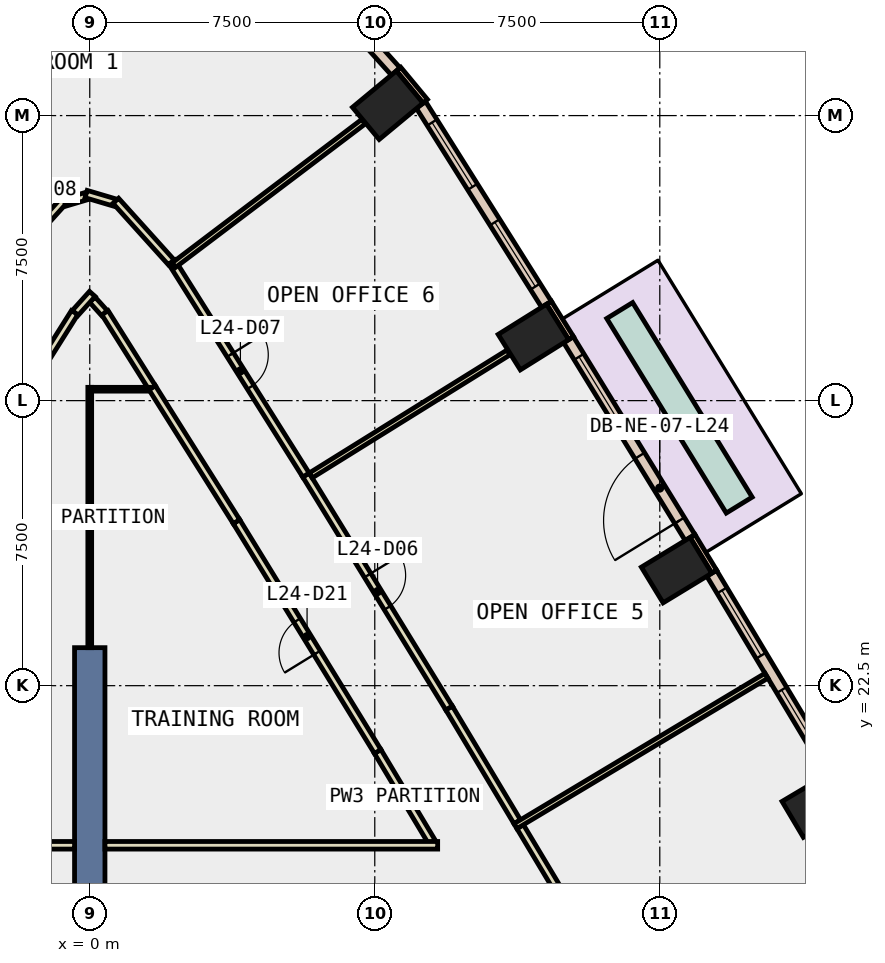
"""IFC4 building model, lengths in metres.
Left out: names, types, materials, properties, quantities, classifications, styles, units other than length and angle.
Written with IfcOpenShell. Run it as: python <this file> out.ifc"""

import sys

from ifc_helpers import new_model, si_unit, direction, frame, frame_2d, origin, origin_2d, place, context, subcontext, project, spatial, rectangle, extrude, element, fill, save


model = new_model("IFC4")
c1 = context("Model", 3, precision=1e-05, world=origin(), true_north=direction((0.0, 1.0)))
c2 = subcontext(c1, "Body", "Model", "MODEL_VIEW")
j1 = project(units=[si_unit("LENGTHUNIT", "METRE"), si_unit("PLANEANGLEUNIT", "RADIAN")], contexts=[c1])
p1 = place(None, origin())
s1 = spatial("IfcSite", under=j1, at=p1, CompositionType="ELEMENT")
p2 = place(p1, origin())
s2 = spatial("IfcBuilding", under=s1, at=p2, CompositionType="ELEMENT")
p3 = place(p2, frame((0.0, 0.0, 111.8)))
s3 = spatial("IfcBuildingStorey", under=s2, at=p3, CompositionType="ELEMENT", Elevation=111.8)
for number, where, z_axis, x_axis in (
    (1, (19.143, 19.364, -0.4), (0.0, 0.0, 1.0), (-0.51, 0.86, 0.0)),
    (2, (15.442, 25.539, -0.4), (0.0, 0.0, 1.0), (-0.52, 0.854, 0.0)),
    (3, (11.675, 31.673, -0.4), (0.0, 0.0, 1.0), (-0.53, 0.848, 0.0)),
    (4, (7.842, 37.774, -0.4), (0.0, 0.0, 1.0), (-0.638, 0.77, 0.0)),
):
    element("IfcColumn", number, at=place(p3, frame(where, z_axis=z_axis, x_axis=x_axis)), inside=s3, PredefinedType="COLUMN", context=c2, shape_type="SweptSolid", body=[
        extrude(rectangle(XDim=1.1, YDim=1.5, at=origin_2d()), origin(), (0.0, 0.0, 1.0), 4.2),
    ])
p4 = place(p3, frame((0.0, 14.5, -0.4), z_axis=(0.0, 0.0, 1.0), x_axis=(0.0, 1.0, 0.0)))
e5 = element("IfcWall", 5, at=p4, inside=s3, PredefinedType="SHEAR", context=c2, shape_type="SweptSolid", body=[
    extrude(rectangle(XDim=9.0, YDim=0.8, at=frame_2d((4.5, 0.0))), origin(), (0.0, 0.0, 1.0), 4.2),
])
p5 = place(p3, frame((16.433, 25.498, 0.0), z_axis=(0.0, 0.0, 1.0), x_axis=(-0.519869515594, 0.854245682901, 0.0)))
e6 = element("IfcWall", 6, at=p5, inside=s3, PredefinedType="STANDARD", context=c2, shape_type="SweptSolid", body=[
    extrude(rectangle(XDim=1.1, YDim=0.15, at=frame_2d((0.55, 0.0))), origin(), (0.0, 0.0, 1.0), 3.8),
])
p6 = place(p3, frame((12.666, 31.644, 0.0), z_axis=(0.0, 0.0, 1.0), x_axis=(-0.52997899071, 0.848010771987, 0.0)))
e7 = element("IfcWall", 7, at=p6, inside=s3, PredefinedType="STANDARD", context=c2, shape_type="SweptSolid", body=[
    extrude(rectangle(XDim=1.1, YDim=0.15, at=frame_2d((0.55, 0.0))), origin(), (0.0, 0.0, 1.0), 3.8),
])
p7 = place(p3, frame((8.828, 37.878, 0.0), z_axis=(0.0, 0.0, 1.0), x_axis=(-0.638435351024, 0.769675452748, 0.0)))
e8 = element("IfcWall", 8, at=p7, inside=s3, PredefinedType="STANDARD", context=c2, shape_type="SweptSolid", body=[
    extrude(rectangle(XDim=1.099, YDim=0.15, at=frame_2d((0.55, 0.0))), origin(), (0.0, 0.0, 1.0), 3.8),
])
p8 = place(p3, frame((19.506, 20.217, 0.0), z_axis=(0.0, 0.0, 1.0), x_axis=(-0.514078503149, 0.857743139057, 0.0)))
e9 = element("IfcWall", 9, at=p8, inside=s3, PredefinedType="STANDARD", context=c2, shape_type="SweptSolid", body=[
    extrude(rectangle(XDim=6.11, YDim=0.3, at=frame_2d((3.055, 0.0))), origin(), (0.0, 0.0, 1.0), 3.8),
])
p9 = place(p8, frame((0.528, 0.0, 0.9)))
e10 = element("IfcOpeningElement", 10, at=p9, cuts=e9, PredefinedType="OPENING", context=c2, shape_type="SweptSolid", body=[
    extrude(rectangle(XDim=2.0, YDim=2.6, at=frame_2d((1.0, 1.3))), frame((0.0, 0.16, 0.0), z_axis=(0.0, -1.0, 0.0), x_axis=(1.0, 0.0, 0.0)), (0.0, 0.0, 1.0), 0.32),
])
p10 = place(p8, frame((3.583, 0.0, 0.9)))
e11 = element("IfcOpeningElement", 11, at=p10, cuts=e9, PredefinedType="OPENING", context=c2, shape_type="SweptSolid", body=[
    extrude(rectangle(XDim=2.0, YDim=2.6, at=frame_2d((1.0, 1.3))), frame((0.0, 0.16, 0.0), z_axis=(0.0, -1.0, 0.0), x_axis=(1.0, 0.0, 0.0)), (0.0, 0.0, 1.0), 0.32),
])
p11 = place(p3, frame((15.796, 26.397, 0.0), z_axis=(0.0, 0.0, 1.0), x_axis=(-0.523417276981, 0.852076495485, 0.0)))
e12 = element("IfcWall", 12, at=p11, inside=s3, PredefinedType="STANDARD", context=c2, shape_type="SweptSolid", body=[
    extrude(rectangle(XDim=6.11, YDim=0.3, at=frame_2d((3.055, 0.0))), origin(), (0.0, 0.0, 1.0), 3.8),
])
p12 = place(p11, frame((0.527, 0.0, 0.0)))
e13 = element("IfcOpeningElement", 13, at=p12, cuts=e12, PredefinedType="OPENING", context=c2, shape_type="SweptSolid", body=[
    extrude(rectangle(XDim=2.0, YDim=2.4, at=frame_2d((1.0, 1.2))), frame((0.0, 0.16, 0.0), z_axis=(0.0, -1.0, 0.0), x_axis=(1.0, 0.0, 0.0)), (0.0, 0.0, 1.0), 0.32),
])
p13 = place(p11, frame((3.582, 0.0, 0.9)))
e14 = element("IfcOpeningElement", 14, at=p13, cuts=e12, PredefinedType="OPENING", context=c2, shape_type="SweptSolid", body=[
    extrude(rectangle(XDim=2.0, YDim=2.6, at=frame_2d((1.0, 1.3))), frame((0.0, 0.16, 0.0), z_axis=(0.0, -1.0, 0.0), x_axis=(1.0, 0.0, 0.0)), (0.0, 0.0, 1.0), 0.32),
])
p14 = place(p3, frame((12.018, 32.535, 0.0), z_axis=(0.0, 0.0, 1.0), x_axis=(-0.532699467907, 0.846304482377, 0.0)))
e15 = element("IfcWall", 15, at=p14, inside=s3, PredefinedType="STANDARD", context=c2, shape_type="SweptSolid", body=[
    extrude(rectangle(XDim=6.202, YDim=0.3, at=frame_2d((3.101, 0.0))), origin(), (0.0, 0.0, 1.0), 3.8),
])
p15 = place(p14, frame((0.551, 0.0, 0.9)))
e16 = element("IfcOpeningElement", 16, at=p15, cuts=e15, PredefinedType="OPENING", context=c2, shape_type="SweptSolid", body=[
    extrude(rectangle(XDim=2.0, YDim=2.6, at=frame_2d((1.0, 1.3))), frame((0.0, 0.16, 0.0), z_axis=(0.0, -1.0, 0.0), x_axis=(1.0, 0.0, 0.0)), (0.0, 0.0, 1.0), 0.32),
])
p16 = place(p14, frame((3.652, 0.0, 0.9)))
e17 = element("IfcOpeningElement", 17, at=p16, cuts=e15, PredefinedType="OPENING", context=c2, shape_type="SweptSolid", body=[
    extrude(rectangle(XDim=2.0, YDim=2.6, at=frame_2d((1.0, 1.3))), frame((0.0, 0.16, 0.0), z_axis=(0.0, -1.0, 0.0), x_axis=(1.0, 0.0, 0.0)), (0.0, 0.0, 1.0), 0.32),
])
p17 = place(p3, frame((8.052, 38.661, 0.0), z_axis=(0.0, 0.0, 1.0), x_axis=(-0.66966434159, 0.742663900834, 0.0)))
e18 = element("IfcWall", 18, at=p17, inside=s3, PredefinedType="STANDARD", context=c2, shape_type="SweptSolid", body=[
    extrude(rectangle(XDim=3.893, YDim=0.3, at=frame_2d((1.946, 0.0))), origin(), (0.0, 0.0, 1.0), 3.8),
])
p18 = place(p17, frame((1.246, 0.0, 0.9)))
e19 = element("IfcOpeningElement", 19, at=p18, cuts=e18, PredefinedType="OPENING", context=c2, shape_type="SweptSolid", body=[
    extrude(rectangle(XDim=1.4, YDim=2.6, at=frame_2d((0.7, 1.3))), frame((0.0, 0.16, 0.0), z_axis=(0.0, -1.0, 0.0), x_axis=(1.0, 0.0, 0.0)), (0.0, 0.0, 1.0), 0.32),
])
p19 = place(p3, frame((17.09, 27.251, 0.0), z_axis=(0.0, 0.0, 1.0), x_axis=(-0.523394506734, 0.852090482473, 0.0)))
e20 = element("IfcWall", 20, at=p19, inside=s3, PredefinedType="STANDARD", context=c2, shape_type="SweptSolid", body=[
    extrude(rectangle(XDim=6.009, YDim=0.8, at=frame_2d((3.004, 0.0))), origin(), (0.0, 0.0, 1.0), 0.8),
])
p20 = place(p3, frame((9.003, 18.386, 0.0), z_axis=(0.0, 0.0, 1.0), x_axis=(-0.513900868925, 0.857849577092, 0.0)))
e21 = element("IfcWall", 21, at=p20, inside=s3, PredefinedType="PARTITIONING", context=c2, shape_type="SweptSolid", body=[
    extrude(rectangle(XDim=2.777, YDim=0.2, at=frame_2d((1.388, 0.0))), origin(), (0.0, 0.0, 1.0), 3.8),
])
p21 = place(p3, frame((7.576, 20.768, 0.0), z_axis=(0.0, 0.0, 1.0), x_axis=(-0.523390991338, 0.852092641786, 0.0)))
e22 = element("IfcWall", 22, at=p21, inside=s3, PredefinedType="PARTITIONING", context=c2, shape_type="SweptSolid", body=[
    extrude(rectangle(XDim=7.098, YDim=0.2, at=frame_2d((3.549, 0.0))), origin(), (0.0, 0.0, 1.0), 3.8),
])
p22 = place(p21, frame((3.049, 0.0, 0.0)))
e23 = element("IfcOpeningElement", 23, at=p22, cuts=e22, PredefinedType="OPENING", context=c2, shape_type="SweptSolid", body=[
    extrude(rectangle(XDim=1.0, YDim=2.1, at=frame_2d((0.5, 1.05))), frame((0.0, 0.11, 0.0), z_axis=(0.0, -1.0, 0.0), x_axis=(1.0, 0.0, 0.0)), (0.0, 0.0, 1.0), 0.22),
])
p23 = place(p3, frame((3.861, 26.816, 0.0), z_axis=(0.0, 0.0, 1.0), x_axis=(-0.532782188792, 0.846252408745, 0.0)))
e24 = element("IfcWall", 24, at=p23, inside=s3, PredefinedType="PARTITIONING", context=c2, shape_type="SweptSolid", body=[
    extrude(rectangle(XDim=4.167, YDim=0.2, at=frame_2d((2.083, 0.0))), origin(), (0.0, 0.0, 1.0), 3.8),
])
p24 = place(p3, frame((1.641, 30.342, 0.0), z_axis=(0.0, 0.0, 1.0), x_axis=(-0.532732797088, 0.846283502679, 0.0)))
e25 = element("IfcWall", 25, at=p24, inside=s3, PredefinedType="PARTITIONING", context=c2, shape_type="SweptSolid", body=[
    extrude(rectangle(XDim=2.333, YDim=0.2, at=frame_2d((1.167, 0.0))), origin(), (0.0, 0.0, 1.0), 3.8),
])
p25 = place(p3, frame((0.384, 32.306, 0.0), z_axis=(0.0, 0.0, 1.0), x_axis=(-0.669306261406, 0.742986627365, 0.0)))
e26 = element("IfcWall", 26, at=p25, inside=s3, PredefinedType="PARTITIONING", context=c2, shape_type="SweptSolid", body=[
    extrude(rectangle(XDim=0.474, YDim=0.2, at=frame_2d((0.237, 0.0))), origin(), (0.0, 0.0, 1.0), 3.8),
])
p26 = place(p3, frame((0.067, 32.807, 0.0), z_axis=(0.0, 0.0, 1.0), x_axis=(-0.66900475403, -0.74325812413, 0.0)))
e27 = element("IfcWall", 27, at=p26, inside=s3, PredefinedType="PARTITIONING", context=c2, shape_type="SweptSolid", body=[
    extrude(rectangle(XDim=0.674, YDim=0.2, at=frame_2d((0.337, 0.0))), origin(), (0.0, 0.0, 1.0), 3.8),
])
p27 = place(p3, frame((-0.398, 32.317, 0.0), z_axis=(0.0, 0.0, 1.0), x_axis=(-0.53276445777, -0.846263571553, 0.0)))
e28 = element("IfcWall", 28, at=p27, inside=s3, PredefinedType="PARTITIONING", context=c2, shape_type="SweptSolid", body=[
    extrude(rectangle(XDim=6.5, YDim=0.2, at=frame_2d((3.25, 0.0))), origin(), (0.0, 0.0, 1.0), 3.8),
])
p28 = place(p3, frame((11.326, 18.79, 0.0), z_axis=(0.0, 0.0, 1.0), x_axis=(0.514155958966, -0.857696712049, 0.0)))
e29 = element("IfcWall", 29, at=p28, inside=s3, PredefinedType="PARTITIONING", context=c2, shape_type="SweptSolid", body=[
    extrude(rectangle(XDim=3.487, YDim=0.2, at=frame_2d((1.744, 0.0))), origin(), (0.0, 0.0, 1.0), 3.8),
])
p29 = place(p3, frame((5.69, 28.042, 0.0), z_axis=(0.0, 0.0, 1.0), x_axis=(0.523381868706, -0.852098245222, 0.0)))
e30 = element("IfcWall", 30, at=p29, inside=s3, PredefinedType="PARTITIONING", context=c2, shape_type="SweptSolid", body=[
    extrude(rectangle(XDim=7.198, YDim=0.2, at=frame_2d((3.599, 0.0))), origin(), (0.0, 0.0, 1.0), 3.8),
])
p30 = place(p29, frame((3.099, 0.0, 0.0)))
e31 = element("IfcOpeningElement", 31, at=p30, cuts=e30, PredefinedType="OPENING", context=c2, shape_type="SweptSolid", body=[
    extrude(rectangle(XDim=1.0, YDim=2.1, at=frame_2d((0.5, 1.05))), frame((0.0, 0.11, 0.0), z_axis=(0.0, -1.0, 0.0), x_axis=(1.0, 0.0, 0.0)), (0.0, 0.0, 1.0), 0.22),
])
p31 = place(p3, frame((9.457, 21.909, 0.0), z_axis=(0.0, 0.0, 1.0), x_axis=(0.513949903813, -0.857820200491, 0.0)))
e32 = element("IfcWall", 32, at=p31, inside=s3, PredefinedType="PARTITIONING", context=c2, shape_type="SweptSolid", body=[
    extrude(rectangle(XDim=3.487, YDim=0.2, at=frame_2d((1.743, 0.0))), origin(), (0.0, 0.0, 1.0), 3.8),
])
p32 = place(p3, frame((2.159, 33.649, 0.0), z_axis=(0.0, 0.0, 1.0), x_axis=(0.532784927572, -0.846250684462, 0.0)))
e33 = element("IfcWall", 33, at=p32, inside=s3, PredefinedType="PARTITIONING", context=c2, shape_type="SweptSolid", body=[
    extrude(rectangle(XDim=6.626, YDim=0.2, at=frame_2d((3.313, 0.0))), origin(), (0.0, 0.0, 1.0), 3.8),
])
p33 = place(p32, frame((2.888, 0.0, 0.0)))
e34 = element("IfcOpeningElement", 34, at=p33, cuts=e33, PredefinedType="OPENING", context=c2, shape_type="SweptSolid", body=[
    extrude(rectangle(XDim=1.0, YDim=2.1, at=frame_2d((0.5, 1.05))), frame((0.0, 0.11, 0.0), z_axis=(0.0, -1.0, 0.0), x_axis=(1.0, 0.0, 0.0)), (0.0, 0.0, 1.0), 0.22),
])
p34 = place(p3, frame((-2.145, 33.639, 0.0), z_axis=(0.0, 0.0, 1.0), x_axis=(0.66965737341, 0.742670184023, 0.0)))
e35 = element("IfcWall", 35, at=p34, inside=s3, PredefinedType="PARTITIONING", context=c2, shape_type="SweptSolid", body=[
    extrude(rectangle(XDim=2.18, YDim=0.2, at=frame_2d((1.09, 0.0))), origin(), (0.0, 0.0, 1.0), 3.8),
])
p35 = place(p34, frame((0.59, 0.0, 0.0)))
e36 = element("IfcOpeningElement", 36, at=p35, cuts=e35, PredefinedType="OPENING", context=c2, shape_type="SweptSolid", body=[
    extrude(rectangle(XDim=1.0, YDim=2.1, at=frame_2d((0.5, 1.05))), frame((0.0, 0.11, 0.0), z_axis=(0.0, -1.0, 0.0), x_axis=(1.0, 0.0, 0.0)), (0.0, 0.0, 1.0), 0.22),
])
p36 = place(p3, frame((-0.656, 35.213, 0.0), z_axis=(0.0, 0.0, 1.0), x_axis=(0.958764375257, 0.284202168777, 0.0)))
e37 = element("IfcWall", 37, at=p36, inside=s3, PredefinedType="PARTITIONING", context=c2, shape_type="SweptSolid", body=[
    extrude(rectangle(XDim=0.584, YDim=0.2, at=frame_2d((0.292, 0.0))), origin(), (0.0, 0.0, 1.0), 3.8),
])
p37 = place(p3, frame((-0.096, 35.436, 0.0), z_axis=(0.0, 0.0, 1.0), x_axis=(0.95867870552, -0.284491018456, 0.0)))
e38 = element("IfcWall", 38, at=p37, inside=s3, PredefinedType="PARTITIONING", context=c2, shape_type="SweptSolid", body=[
    extrude(rectangle(XDim=0.784, YDim=0.2, at=frame_2d((0.392, 0.0))), origin(), (0.0, 0.0, 1.0), 3.8),
])
p38 = place(p3, frame((0.685, 35.258, 0.0), z_axis=(0.0, 0.0, 1.0), x_axis=(0.66965737341, -0.742670184023, 0.0)))
e39 = element("IfcWall", 39, at=p38, inside=s3, PredefinedType="PARTITIONING", context=c2, shape_type="SweptSolid", body=[
    extrude(rectangle(XDim=2.18, YDim=0.2, at=frame_2d((1.09, 0.0))), origin(), (0.0, 0.0, 1.0), 3.8),
])
for number, where, z_axis, x_axis in (
    (40, (0.4, 18.3, 0.0), (0.0, 0.0, 1.0), (1.0, 0.0, 0.0)),
    (41, (-9.155, 18.3, 0.0), (0.0, 0.0, 1.0), (1.0, 0.0, 0.0)),
):
    element("IfcWall", number, at=place(p3, frame(where, z_axis=z_axis, x_axis=x_axis)), inside=s3, PredefinedType="PARTITIONING", context=c2, shape_type="SweptSolid", body=[
        extrude(rectangle(XDim=8.755, YDim=0.2, at=frame_2d((4.377, 0.0))), origin(), (0.0, 0.0, 1.0), 3.8),
    ])
p39 = place(p3, frame((0.0, 23.5, 0.0), z_axis=(0.0, 0.0, 1.0), x_axis=(0.0, 1.0, 0.0)))
e42 = element("IfcWall", 42, at=p39, inside=s3, PredefinedType="PARTITIONING", context=c2, shape_type="SweptSolid", body=[
    extrude(rectangle(XDim=6.85, YDim=0.1, at=frame_2d((3.425, 0.0))), origin(), (0.0, 0.0, 1.0), 3.8),
])
p40 = place(p3, frame((0.05, 30.3, 0.0), z_axis=(0.0, 0.0, 1.0), x_axis=(1.0, 0.0, 0.0)))
e43 = element("IfcWall", 43, at=p40, inside=s3, PredefinedType="PARTITIONING", context=c2, shape_type="SweptSolid", body=[
    extrude(rectangle(XDim=1.518, YDim=0.1, at=frame_2d((0.759, 0.0))), origin(), (0.0, 0.0, 1.0), 3.8),
])
p41 = place(p3, frame((11.202, 18.803, 0.0), z_axis=(0.0, 0.0, 1.0), x_axis=(0.857778149162, 0.514020084062, 0.0)))
e44 = element("IfcWall", 44, at=p41, inside=s3, PredefinedType="PARTITIONING", context=c2, shape_type="SweptSolid", body=[
    extrude(rectangle(XDim=7.7, YDim=0.15, at=frame_2d((3.85, 0.0))), origin(), (0.0, 0.0, 1.0), 3.8),
])
p42 = place(p3, frame((5.814, 28.031, 0.0), z_axis=(0.0, 0.0, 1.0), x_axis=(0.849222099047, 0.528035819324, 0.0)))
e45 = element("IfcWall", 45, at=p42, inside=s3, PredefinedType="PARTITIONING", context=c2, shape_type="SweptSolid", body=[
    extrude(rectangle(XDim=6.13, YDim=0.15, at=frame_2d((3.065, 0.0))), origin(), (0.0, 0.0, 1.0), 3.8),
])
p43 = place(p3, frame((2.212, 33.565, 0.0), z_axis=(0.0, 0.0, 1.0), x_axis=(0.797488074979, 0.603334708322, 0.0)))
e46 = element("IfcWall", 46, at=p43, inside=s3, PredefinedType="PARTITIONING", context=c2, shape_type="SweptSolid", body=[
    extrude(rectangle(XDim=6.257, YDim=0.15, at=frame_2d((3.128, 0.0))), origin(), (0.0, 0.0, 1.0), 3.8),
])
p44 = place(p9, origin())
e47 = element("IfcWindow", 47, at=p44, inside=s3, PartitioningType="SINGLE_PANEL", PredefinedType="WINDOW", context=c2, shape_type="SweptSolid", body=[
    extrude(rectangle(XDim=2.0, YDim=2.6, at=frame_2d((1.0, 1.3))), frame((0.0, 0.03, 0.0), z_axis=(0.0, -1.0, 0.0), x_axis=(1.0, 0.0, 0.0)), (0.0, 0.0, 1.0), 0.06),
])
fill(e10, e47)
p45 = place(p10, origin())
e48 = element("IfcWindow", 48, at=p45, inside=s3, PartitioningType="SINGLE_PANEL", PredefinedType="WINDOW", context=c2, shape_type="SweptSolid", body=[
    extrude(rectangle(XDim=2.0, YDim=2.6, at=frame_2d((1.0, 1.3))), frame((0.0, 0.03, 0.0), z_axis=(0.0, -1.0, 0.0), x_axis=(1.0, 0.0, 0.0)), (0.0, 0.0, 1.0), 0.06),
])
fill(e11, e48)
p46 = place(p12, origin())
e49 = element("IfcDoor", 49, at=p46, inside=s3, OperationType="SLIDING_TO_LEFT", PredefinedType="DOOR", context=c2, shape_type="SweptSolid", body=[
    extrude(rectangle(XDim=2.0, YDim=2.4, at=frame_2d((1.0, 1.2))), frame((0.0, 0.025, 0.0), z_axis=(0.0, -1.0, 0.0), x_axis=(1.0, 0.0, 0.0)), (0.0, 0.0, 1.0), 0.05),
])
fill(e13, e49)
p47 = place(p13, origin())
e50 = element("IfcWindow", 50, at=p47, inside=s3, PartitioningType="SINGLE_PANEL", PredefinedType="WINDOW", context=c2, shape_type="SweptSolid", body=[
    extrude(rectangle(XDim=2.0, YDim=2.6, at=frame_2d((1.0, 1.3))), frame((0.0, 0.03, 0.0), z_axis=(0.0, -1.0, 0.0), x_axis=(1.0, 0.0, 0.0)), (0.0, 0.0, 1.0), 0.06),
])
fill(e14, e50)
p48 = place(p15, origin())
e51 = element("IfcWindow", 51, at=p48, inside=s3, PartitioningType="SINGLE_PANEL", PredefinedType="WINDOW", context=c2, shape_type="SweptSolid", body=[
    extrude(rectangle(XDim=2.0, YDim=2.6, at=frame_2d((1.0, 1.3))), frame((0.0, 0.03, 0.0), z_axis=(0.0, -1.0, 0.0), x_axis=(1.0, 0.0, 0.0)), (0.0, 0.0, 1.0), 0.06),
])
fill(e16, e51)
p49 = place(p16, origin())
e52 = element("IfcWindow", 52, at=p49, inside=s3, PartitioningType="SINGLE_PANEL", PredefinedType="WINDOW", context=c2, shape_type="SweptSolid", body=[
    extrude(rectangle(XDim=2.0, YDim=2.6, at=frame_2d((1.0, 1.3))), frame((0.0, 0.03, 0.0), z_axis=(0.0, -1.0, 0.0), x_axis=(1.0, 0.0, 0.0)), (0.0, 0.0, 1.0), 0.06),
])
fill(e17, e52)
p50 = place(p30, origin())
e53 = element("IfcDoor", 53, at=p50, inside=s3, OperationType="SINGLE_SWING_LEFT", PredefinedType="DOOR", context=c2, shape_type="SweptSolid", body=[
    extrude(rectangle(XDim=1.0, YDim=2.1, at=frame_2d((0.5, 1.05))), frame((0.0, 0.025, 0.0), z_axis=(0.0, -1.0, 0.0), x_axis=(1.0, 0.0, 0.0)), (0.0, 0.0, 1.0), 0.05),
])
fill(e31, e53)
p51 = place(p33, origin())
e54 = element("IfcDoor", 54, at=p51, inside=s3, OperationType="SINGLE_SWING_LEFT", PredefinedType="DOOR", context=c2, shape_type="SweptSolid", body=[
    extrude(rectangle(XDim=1.0, YDim=2.1, at=frame_2d((0.5, 1.05))), frame((0.0, 0.025, 0.0), z_axis=(0.0, -1.0, 0.0), x_axis=(1.0, 0.0, 0.0)), (0.0, 0.0, 1.0), 0.05),
])
fill(e34, e54)
p52 = place(p22, origin())
e55 = element("IfcDoor", 55, at=p52, inside=s3, OperationType="SINGLE_SWING_LEFT", PredefinedType="DOOR", context=c2, shape_type="SweptSolid", body=[
    extrude(rectangle(XDim=1.0, YDim=2.1, at=frame_2d((0.5, 1.05))), frame((0.0, 0.025, 0.0), z_axis=(0.0, -1.0, 0.0), x_axis=(1.0, 0.0, 0.0)), (0.0, 0.0, 1.0), 0.05),
])
fill(e23, e55)
save(model, sys.argv[1])
